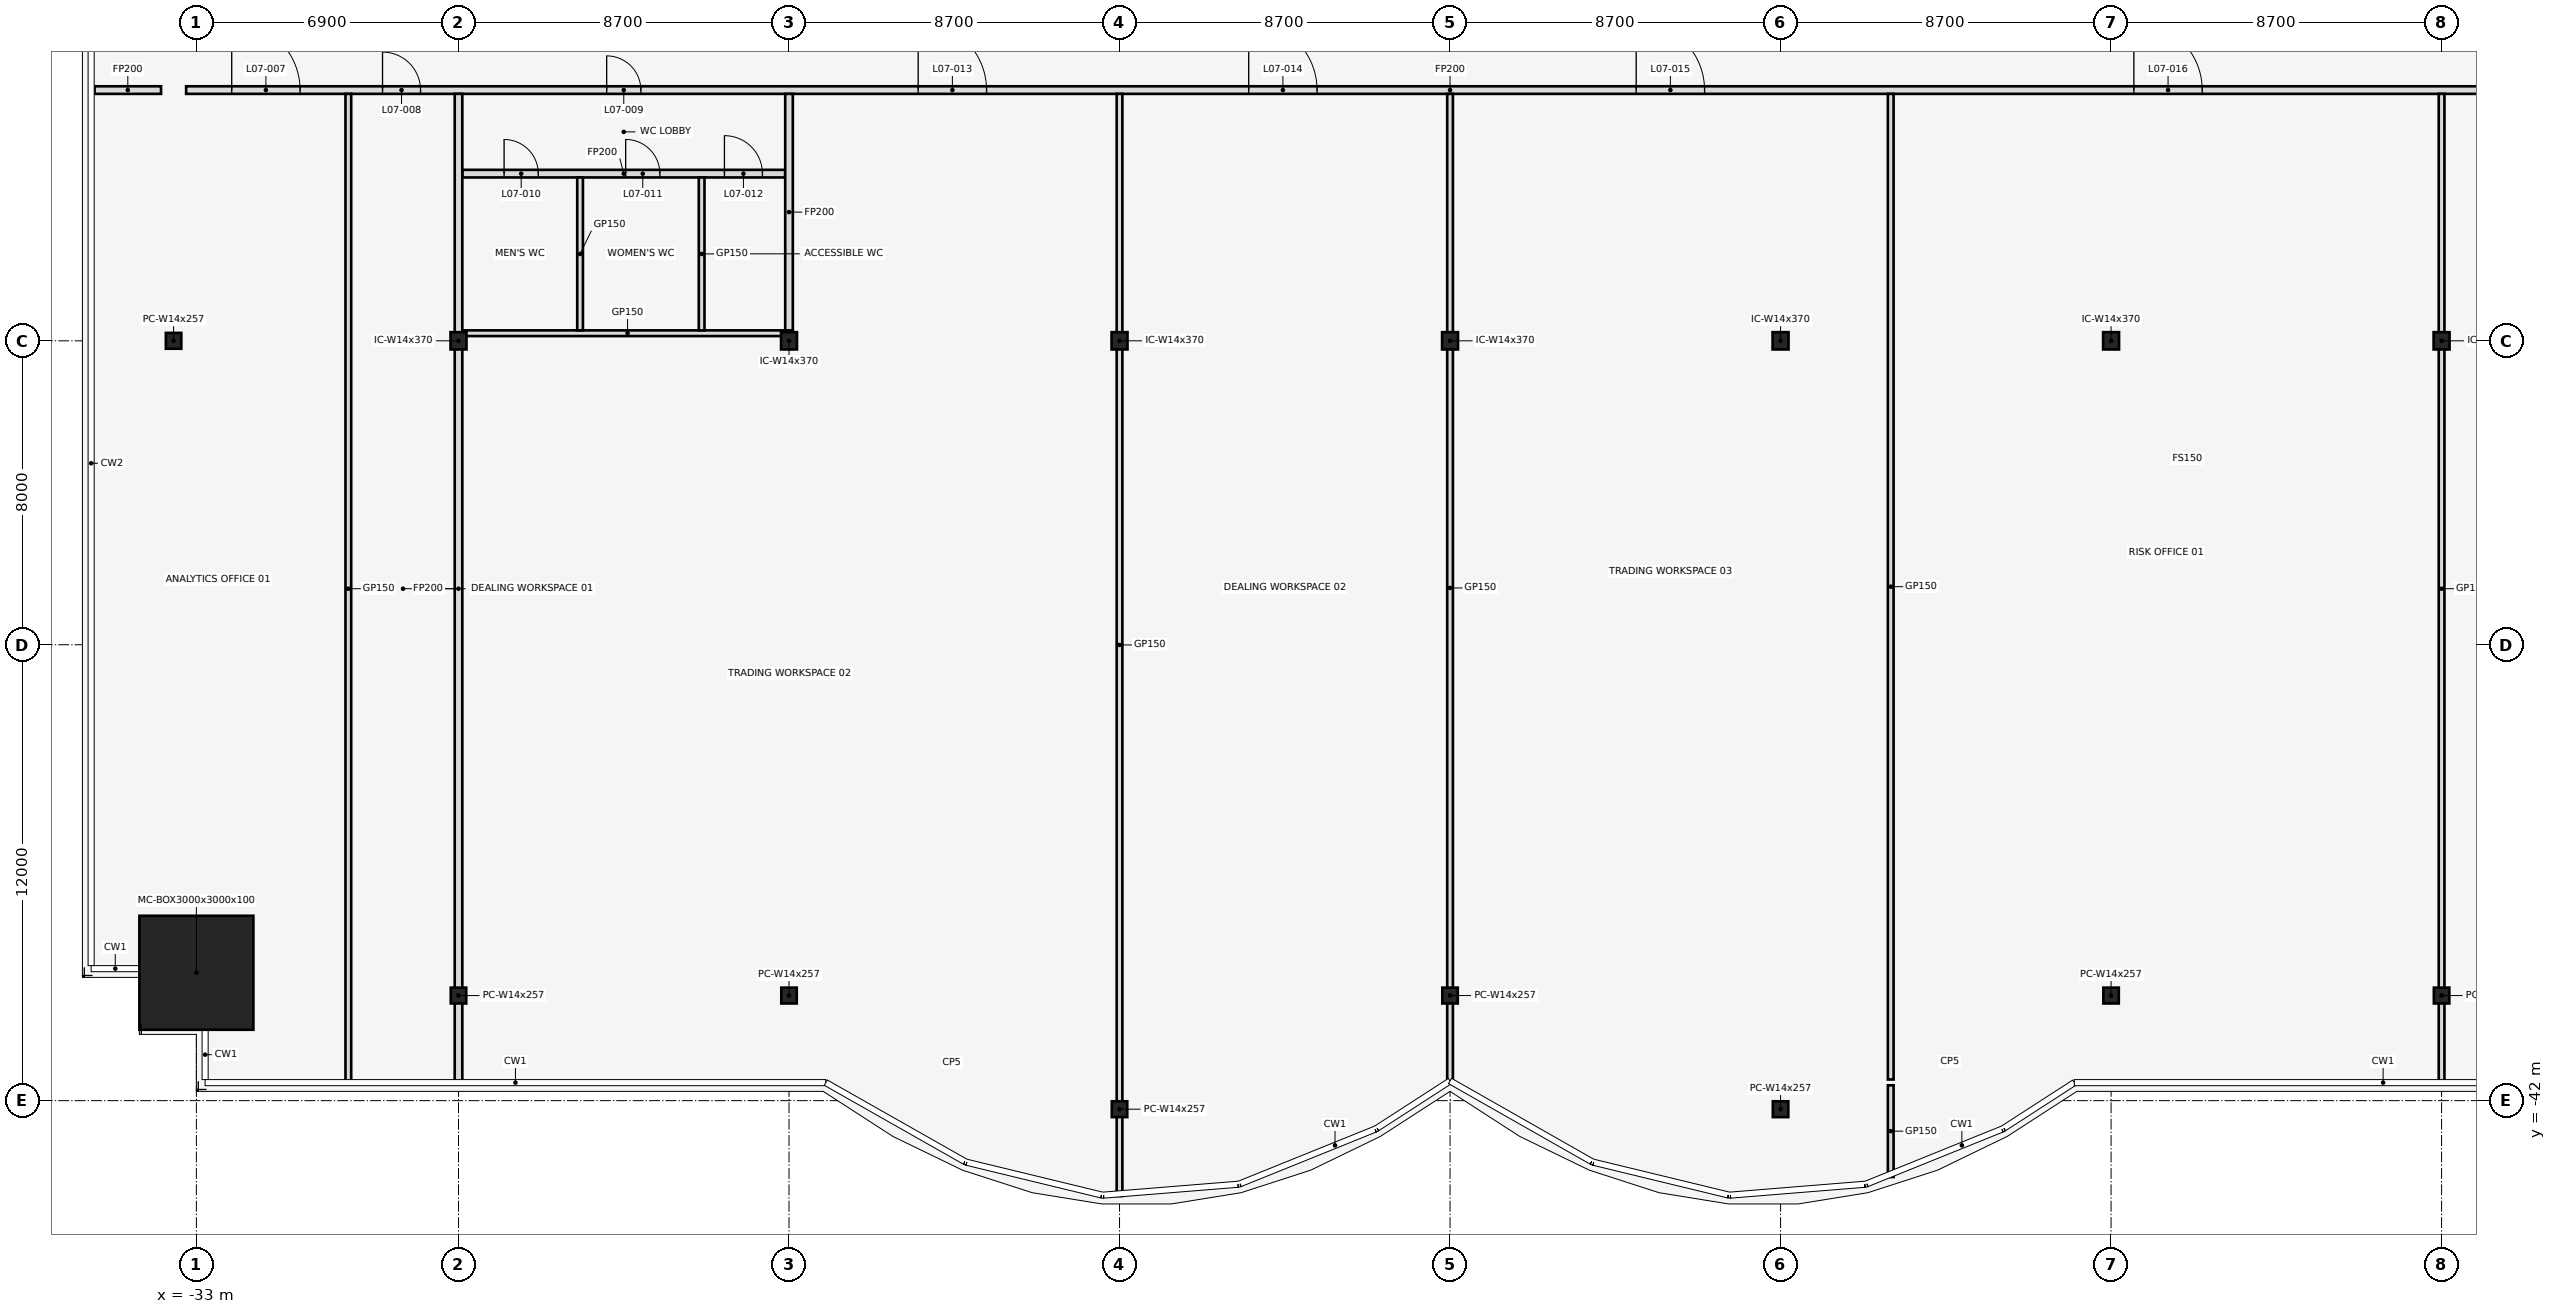
"""IFC4 building model, lengths in metres.
Left out: names, types, materials, properties, quantities, classifications, styles, units other than length and angle.
Written with IfcOpenShell. Run it as: python <this file> out.ifc"""

import sys

from ifc_helpers import new_model, si_unit, direction, frame, frame_2d, origin, origin_2d, place, context, subcontext, project, spatial, rectangle, hollow_rectangle, i_section, extrude, element, fill, save


model = new_model("IFC4")
c1 = context("Model", 3, precision=1e-05, world=origin(), true_north=direction((0.0, 1.0)))
c2 = subcontext(c1, "Body", "Model", "MODEL_VIEW")
j1 = project(units=[si_unit("LENGTHUNIT", "METRE"), si_unit("PLANEANGLEUNIT", "RADIAN")], contexts=[c1])
p1 = place(None, origin())
s1 = spatial("IfcSite", under=j1, at=p1, CompositionType="ELEMENT")
p2 = place(p1, origin())
s2 = spatial("IfcBuilding", under=s1, at=p2, CompositionType="ELEMENT")
p3 = place(p2, frame((0.0, 0.0, 39.5)))
s3 = spatial("IfcBuildingStorey", under=s2, at=p3, CompositionType="ELEMENT", Elevation=39.5)
p4 = place(p3, frame((-33.0, -38.634, 0.0), z_axis=(0.0, 0.0, 1.0), x_axis=(1.0, 0.0, 0.0)))
e1 = element("IfcColumn", 1, at=p4, inside=s3, PredefinedType="COLUMN", context=c2, shape_type="SweptSolid", body=[
    extrude(hollow_rectangle(XDim=3.0, YDim=3.0, WallThickness=0.1, at=origin_2d()), origin(), (0.0, 0.0, 1.0), 4.5),
])
for number, where, z_axis, x_axis in (
    (2, (-26.1, -39.234, 0.0), (0.0, 0.0, 1.0), (1.0, 0.0, 0.0)),
    (3, (-17.4, -39.234, 0.0), (0.0, 0.0, 1.0), (1.0, 0.0, 0.0)),
    (4, (-8.7, -42.225, 0.0), (0.0, 0.0, 1.0), (1.0, 0.0, 0.0)),
    (5, (0.0, -39.234, 0.0), (0.0, 0.0, 1.0), (1.0, 0.0, 0.0)),
    (6, (8.7, -42.225, 0.0), (0.0, 0.0, 1.0), (1.0, 0.0, 0.0)),
    (7, (17.4, -39.234, 0.0), (0.0, 0.0, 1.0), (1.0, 0.0, 0.0)),
    (8, (26.1, -39.234, 0.0), (0.0, 0.0, 1.0), (1.0, 0.0, 0.0)),
    (9, (-33.6, -22.0, 0.0), (0.0, 0.0, 1.0), (1.0, 0.0, 0.0)),
):
    element("IfcColumn", number, at=place(p3, frame(where, z_axis=z_axis, x_axis=x_axis)), inside=s3, PredefinedType="COLUMN", context=c2, shape_type="SweptSolid", body=[
        extrude(i_section(OverallWidth=0.406, OverallDepth=0.417, WebThickness=0.03, FlangeThickness=0.048, at=origin_2d()), origin(), (0.0, 0.0, 1.0), 4.5),
    ])
for number, where, z_axis, x_axis in (
    (10, (-26.1, -22.0, 0.0), (0.0, 0.0, 1.0), (1.0, 0.0, 0.0)),
    (11, (-17.4, -22.0, 0.0), (0.0, 0.0, 1.0), (1.0, 0.0, 0.0)),
    (12, (-8.7, -22.0, 0.0), (0.0, 0.0, 1.0), (1.0, 0.0, 0.0)),
    (13, (0.0, -22.0, 0.0), (0.0, 0.0, 1.0), (1.0, 0.0, 0.0)),
    (14, (8.7, -22.0, 0.0), (0.0, 0.0, 1.0), (1.0, 0.0, 0.0)),
    (15, (17.4, -22.0, 0.0), (0.0, 0.0, 1.0), (1.0, 0.0, 0.0)),
    (16, (26.1, -22.0, 0.0), (0.0, 0.0, 1.0), (1.0, 0.0, 0.0)),
):
    element("IfcColumn", number, at=place(p3, frame(where, z_axis=z_axis, x_axis=x_axis)), inside=s3, PredefinedType="COLUMN", context=c2, shape_type="SweptSolid", body=[
        extrude(i_section(OverallWidth=0.419, OverallDepth=0.455, WebThickness=0.042, FlangeThickness=0.068, at=origin_2d()), origin(), (0.0, 0.0, 1.0), 4.5),
    ])
p5 = place(p3, frame((-26.0, -21.8, 0.0), z_axis=(0.0, 0.0, 1.0), x_axis=(1.0, 0.0, 0.0)))
e17 = element("IfcWall", 17, at=p5, inside=s3, PredefinedType="PARTITIONING", context=c2, shape_type="SweptSolid", body=[
    extrude(rectangle(XDim=8.7, YDim=0.15, at=frame_2d((4.35, 0.0))), origin(), (0.0, 0.0, 1.0), 3.418),
])
p6 = place(p3, frame((-26.0, -17.6, 0.0), z_axis=(0.0, 0.0, 1.0), x_axis=(1.0, 0.0, 0.0)))
e18 = element("IfcWall", 18, at=p6, inside=s3, PredefinedType="PARTITIONING", context=c2, shape_type="SweptSolid", body=[
    extrude(rectangle(XDim=8.5, YDim=0.2, at=frame_2d((4.25, 0.0))), origin(), (0.0, 0.0, 1.0), 3.418),
])
p7 = place(p6, frame((1.1, 0.0, 0.0)))
e19 = element("IfcOpeningElement", 19, at=p7, cuts=e18, PredefinedType="OPENING", context=c2, shape_type="SweptSolid", body=[
    extrude(rectangle(XDim=0.9, YDim=2.1, at=frame_2d((0.45, 1.05))), frame((0.0, 0.112, 0.0), z_axis=(0.0, -1.0, 0.0), x_axis=(1.0, 0.0, 0.0)), (0.0, 0.0, 1.0), 0.224),
])
p8 = place(p6, frame((4.3, 0.0, 0.0)))
e20 = element("IfcOpeningElement", 20, at=p8, cuts=e18, PredefinedType="OPENING", context=c2, shape_type="SweptSolid", body=[
    extrude(rectangle(XDim=0.9, YDim=2.1, at=frame_2d((0.45, 1.05))), frame((0.0, 0.112, 0.0), z_axis=(0.0, -1.0, 0.0), x_axis=(1.0, 0.0, 0.0)), (0.0, 0.0, 1.0), 0.224),
])
p9 = place(p6, frame((6.9, 0.0, 0.0)))
e21 = element("IfcOpeningElement", 21, at=p9, cuts=e18, PredefinedType="OPENING", context=c2, shape_type="SweptSolid", body=[
    extrude(rectangle(XDim=1.0, YDim=2.1, at=frame_2d((0.5, 1.05))), frame((0.0, 0.112, 0.0), z_axis=(0.0, -1.0, 0.0), x_axis=(1.0, 0.0, 0.0)), (0.0, 0.0, 1.0), 0.224),
])
p10 = place(p3, frame((-35.68, -15.4, 0.0), z_axis=(0.0, 0.0, 1.0), x_axis=(1.0, 0.0, 0.0)))
e22 = element("IfcWall", 22, at=p10, inside=s3, PredefinedType="PARTITIONING", context=c2, shape_type="SweptSolid", body=[
    extrude(rectangle(XDim=1.75, YDim=0.2, at=frame_2d((0.875, 0.0))), origin(), (0.0, 0.0, 1.0), 3.418),
])
p11 = place(p3, frame((-33.27, -15.4, 0.0), z_axis=(0.0, 0.0, 1.0), x_axis=(1.0, 0.0, 0.0)))
e23 = element("IfcWall", 23, at=p11, inside=s3, PredefinedType="PARTITIONING", context=c2, shape_type="SweptSolid", body=[
    extrude(rectangle(XDim=66.54, YDim=0.2, at=frame_2d((33.27, 0.0))), origin(), (0.0, 0.0, 1.0), 3.418),
])
p12 = place(p11, frame((1.2, 0.0, 0.0)))
e24 = element("IfcOpeningElement", 24, at=p12, cuts=e23, PredefinedType="OPENING", context=c2, shape_type="SweptSolid", body=[
    extrude(rectangle(XDim=1.8, YDim=2.1, at=frame_2d((0.9, 1.05))), frame((0.0, 0.112, 0.0), z_axis=(0.0, -1.0, 0.0), x_axis=(1.0, 0.0, 0.0)), (0.0, 0.0, 1.0), 0.224),
])
p13 = place(p11, frame((5.17, 0.0, 0.0)))
e25 = element("IfcOpeningElement", 25, at=p13, cuts=e23, PredefinedType="OPENING", context=c2, shape_type="SweptSolid", body=[
    extrude(rectangle(XDim=1.0, YDim=2.1, at=frame_2d((0.5, 1.05))), frame((0.0, 0.112, 0.0), z_axis=(0.0, -1.0, 0.0), x_axis=(1.0, 0.0, 0.0)), (0.0, 0.0, 1.0), 0.224),
])
p14 = place(p11, frame((11.07, 0.0, 0.0)))
e26 = element("IfcOpeningElement", 26, at=p14, cuts=e23, PredefinedType="OPENING", context=c2, shape_type="SweptSolid", body=[
    extrude(rectangle(XDim=0.9, YDim=2.1, at=frame_2d((0.45, 1.05))), frame((0.0, 0.112, 0.0), z_axis=(0.0, -1.0, 0.0), x_axis=(1.0, 0.0, 0.0)), (0.0, 0.0, 1.0), 0.224),
])
p15 = place(p11, frame((19.27, 0.0, 0.0)))
e27 = element("IfcOpeningElement", 27, at=p15, cuts=e23, PredefinedType="OPENING", context=c2, shape_type="SweptSolid", body=[
    extrude(rectangle(XDim=1.8, YDim=2.1, at=frame_2d((0.9, 1.05))), frame((0.0, 0.112, 0.0), z_axis=(0.0, -1.0, 0.0), x_axis=(1.0, 0.0, 0.0)), (0.0, 0.0, 1.0), 0.224),
])
p16 = place(p11, frame((27.97, 0.0, 0.0)))
e28 = element("IfcOpeningElement", 28, at=p16, cuts=e23, PredefinedType="OPENING", context=c2, shape_type="SweptSolid", body=[
    extrude(rectangle(XDim=1.8, YDim=2.1, at=frame_2d((0.9, 1.05))), frame((0.0, 0.112, 0.0), z_axis=(0.0, -1.0, 0.0), x_axis=(1.0, 0.0, 0.0)), (0.0, 0.0, 1.0), 0.224),
])
p17 = place(p11, frame((38.17, 0.0, 0.0)))
e29 = element("IfcOpeningElement", 29, at=p17, cuts=e23, PredefinedType="OPENING", context=c2, shape_type="SweptSolid", body=[
    extrude(rectangle(XDim=1.8, YDim=2.1, at=frame_2d((0.9, 1.05))), frame((0.0, 0.112, 0.0), z_axis=(0.0, -1.0, 0.0), x_axis=(1.0, 0.0, 0.0)), (0.0, 0.0, 1.0), 0.224),
])
p18 = place(p11, frame((51.27, 0.0, 0.0)))
e30 = element("IfcOpeningElement", 30, at=p18, cuts=e23, PredefinedType="OPENING", context=c2, shape_type="SweptSolid", body=[
    extrude(rectangle(XDim=1.8, YDim=2.1, at=frame_2d((0.9, 1.05))), frame((0.0, 0.112, 0.0), z_axis=(0.0, -1.0, 0.0), x_axis=(1.0, 0.0, 0.0)), (0.0, 0.0, 1.0), 0.224),
])
p19 = place(p11, frame((62.07, 0.0, 0.0)))
e31 = element("IfcOpeningElement", 31, at=p19, cuts=e23, PredefinedType="OPENING", context=c2, shape_type="SweptSolid", body=[
    extrude(rectangle(XDim=1.8, YDim=2.1, at=frame_2d((0.9, 1.05))), frame((0.0, 0.112, 0.0), z_axis=(0.0, -1.0, 0.0), x_axis=(1.0, 0.0, 0.0)), (0.0, 0.0, 1.0), 0.224),
])
p20 = place(p3, frame((-29.0, -41.55, 0.0), z_axis=(0.0, 0.0, 1.0), x_axis=(0.0, 1.0, 0.0)))
e32 = element("IfcWall", 32, at=p20, inside=s3, PredefinedType="PARTITIONING", context=c2, shape_type="SweptSolid", body=[
    extrude(rectangle(XDim=26.05, YDim=0.15, at=frame_2d((13.025, 0.0))), origin(), (0.0, 0.0, 1.0), 3.418),
])
p21 = place(p3, frame((-26.1, -41.55, 0.0), z_axis=(0.0, 0.0, 1.0), x_axis=(0.0, 1.0, 0.0)))
e33 = element("IfcWall", 33, at=p21, inside=s3, PredefinedType="PARTITIONING", context=c2, shape_type="SweptSolid", body=[
    extrude(rectangle(XDim=26.05, YDim=0.2, at=frame_2d((13.025, 0.0))), origin(), (0.0, 0.0, 1.0), 3.418),
])
for number, where, z_axis, x_axis in (
    (34, (-22.9, -21.725, 0.0), (0.0, 0.0, 1.0), (0.0, 1.0, 0.0)),
    (35, (-19.7, -21.725, 0.0), (0.0, 0.0, 1.0), (0.0, 1.0, 0.0)),
):
    element("IfcWall", number, at=place(p3, frame(where, z_axis=z_axis, x_axis=x_axis)), inside=s3, PredefinedType="PARTITIONING", context=c2, shape_type="SweptSolid", body=[
        extrude(rectangle(XDim=4.025, YDim=0.15, at=frame_2d((2.013, 0.0))), origin(), (0.0, 0.0, 1.0), 3.418),
    ])
p22 = place(p3, frame((-17.4, -21.725, 0.0), z_axis=(0.0, 0.0, 1.0), x_axis=(0.0, 1.0, 0.0)))
e36 = element("IfcWall", 36, at=p22, inside=s3, PredefinedType="PARTITIONING", context=c2, shape_type="SweptSolid", body=[
    extrude(rectangle(XDim=6.225, YDim=0.2, at=frame_2d((3.113, 0.0))), origin(), (0.0, 0.0, 1.0), 3.418),
])
p23 = place(p3, frame((-8.7, -44.51, 0.0), z_axis=(0.0, 0.0, 1.0), x_axis=(0.0, 1.0, 0.0)))
e37 = element("IfcWall", 37, at=p23, inside=s3, PredefinedType="PARTITIONING", context=c2, shape_type="SweptSolid", body=[
    extrude(rectangle(XDim=29.01, YDim=0.15, at=frame_2d((14.505, 0.0))), origin(), (0.0, 0.0, 1.0), 3.418),
])
p24 = place(p3, frame((0.0, -41.51, 0.0), z_axis=(0.0, 0.0, 1.0), x_axis=(0.0, 1.0, 0.0)))
e38 = element("IfcWall", 38, at=p24, inside=s3, PredefinedType="PARTITIONING", context=c2, shape_type="SweptSolid", body=[
    extrude(rectangle(XDim=26.01, YDim=0.15, at=frame_2d((13.005, 0.0))), origin(), (0.0, 0.0, 1.0), 3.418),
])
p25 = place(p3, frame((11.6, -44.01, 0.0), z_axis=(0.0, 0.0, 1.0), x_axis=(0.0, 1.0, 0.0)))
e39 = element("IfcWall", 39, at=p25, inside=s3, PredefinedType="PARTITIONING", context=c2, shape_type="SweptSolid", body=[
    extrude(rectangle(XDim=2.414, YDim=0.15, at=frame_2d((1.207, 0.0))), origin(), (0.0, 0.0, 1.0), 3.418),
])
p26 = place(p3, frame((11.6, -41.443, 0.0), z_axis=(0.0, 0.0, 1.0), x_axis=(0.0, 1.0, 0.0)))
e40 = element("IfcWall", 40, at=p26, inside=s3, PredefinedType="PARTITIONING", context=c2, shape_type="SweptSolid", body=[
    extrude(rectangle(XDim=25.943, YDim=0.15, at=frame_2d((12.972, 0.0))), origin(), (0.0, 0.0, 1.0), 3.418),
])
p27 = place(p3, frame((26.1, -41.55, 0.0), z_axis=(0.0, 0.0, 1.0), x_axis=(0.0, 1.0, 0.0)))
e41 = element("IfcWall", 41, at=p27, inside=s3, PredefinedType="PARTITIONING", context=c2, shape_type="SweptSolid", body=[
    extrude(rectangle(XDim=26.05, YDim=0.15, at=frame_2d((13.025, 0.0))), origin(), (0.0, 0.0, 1.0), 3.418),
])
p28 = place(p12, origin())
e42 = element("IfcDoor", 42, at=p28, inside=s3, OperationType="SINGLE_SWING_LEFT", PredefinedType="DOOR", context=c2, shape_type="SweptSolid", body=[
    extrude(rectangle(XDim=1.8, YDim=2.1, at=frame_2d((0.9, 1.05))), frame((0.0, 0.025, 0.0), z_axis=(0.0, -1.0, 0.0), x_axis=(1.0, 0.0, 0.0)), (0.0, 0.0, 1.0), 0.05),
])
fill(e24, e42)
p29 = place(p13, frame((1.0, 0.0, 0.0), z_axis=(0.0, 0.0, 1.0), x_axis=(-1.0, 0.0, 0.0)))
e43 = element("IfcDoor", 43, at=p29, inside=s3, OperationType="SINGLE_SWING_RIGHT", PredefinedType="DOOR", context=c2, shape_type="SweptSolid", body=[
    extrude(rectangle(XDim=1.0, YDim=2.1, at=frame_2d((0.5, 1.05))), frame((0.0, 0.025, 0.0), z_axis=(0.0, -1.0, 0.0), x_axis=(1.0, 0.0, 0.0)), (0.0, 0.0, 1.0), 0.05),
])
fill(e25, e43)
p30 = place(p14, frame((0.9, 0.0, 0.0), z_axis=(0.0, 0.0, 1.0), x_axis=(-1.0, 0.0, 0.0)))
e44 = element("IfcDoor", 44, at=p30, inside=s3, OperationType="SINGLE_SWING_RIGHT", PredefinedType="DOOR", context=c2, shape_type="SweptSolid", body=[
    extrude(rectangle(XDim=0.9, YDim=2.1, at=frame_2d((0.45, 1.05))), frame((0.0, 0.025, 0.0), z_axis=(0.0, -1.0, 0.0), x_axis=(1.0, 0.0, 0.0)), (0.0, 0.0, 1.0), 0.05),
])
fill(e26, e44)
p31 = place(p7, frame((0.9, 0.0, 0.0), z_axis=(0.0, 0.0, 1.0), x_axis=(-1.0, 0.0, 0.0)))
e45 = element("IfcDoor", 45, at=p31, inside=s3, OperationType="SINGLE_SWING_LEFT", PredefinedType="DOOR", context=c2, shape_type="SweptSolid", body=[
    extrude(rectangle(XDim=0.9, YDim=2.1, at=frame_2d((0.45, 1.05))), frame((0.0, 0.025, 0.0), z_axis=(0.0, -1.0, 0.0), x_axis=(1.0, 0.0, 0.0)), (0.0, 0.0, 1.0), 0.05),
])
fill(e19, e45)
p32 = place(p8, frame((0.9, 0.0, 0.0), z_axis=(0.0, 0.0, 1.0), x_axis=(-1.0, 0.0, 0.0)))
e46 = element("IfcDoor", 46, at=p32, inside=s3, OperationType="SINGLE_SWING_RIGHT", PredefinedType="DOOR", context=c2, shape_type="SweptSolid", body=[
    extrude(rectangle(XDim=0.9, YDim=2.1, at=frame_2d((0.45, 1.05))), frame((0.0, 0.025, 0.0), z_axis=(0.0, -1.0, 0.0), x_axis=(1.0, 0.0, 0.0)), (0.0, 0.0, 1.0), 0.05),
])
fill(e20, e46)
p33 = place(p9, frame((1.0, 0.0, 0.0), z_axis=(0.0, 0.0, 1.0), x_axis=(-1.0, 0.0, 0.0)))
e47 = element("IfcDoor", 47, at=p33, inside=s3, OperationType="SINGLE_SWING_RIGHT", PredefinedType="DOOR", context=c2, shape_type="SweptSolid", body=[
    extrude(rectangle(XDim=1.0, YDim=2.1, at=frame_2d((0.5, 1.05))), frame((0.0, 0.025, 0.0), z_axis=(0.0, -1.0, 0.0), x_axis=(1.0, 0.0, 0.0)), (0.0, 0.0, 1.0), 0.05),
])
fill(e21, e47)
p34 = place(p15, origin())
e48 = element("IfcDoor", 48, at=p34, inside=s3, OperationType="SINGLE_SWING_LEFT", PredefinedType="DOOR", context=c2, shape_type="SweptSolid", body=[
    extrude(rectangle(XDim=1.8, YDim=2.1, at=frame_2d((0.9, 1.05))), frame((0.0, 0.025, 0.0), z_axis=(0.0, -1.0, 0.0), x_axis=(1.0, 0.0, 0.0)), (0.0, 0.0, 1.0), 0.05),
])
fill(e27, e48)
p35 = place(p16, origin())
e49 = element("IfcDoor", 49, at=p35, inside=s3, OperationType="SINGLE_SWING_LEFT", PredefinedType="DOOR", context=c2, shape_type="SweptSolid", body=[
    extrude(rectangle(XDim=1.8, YDim=2.1, at=frame_2d((0.9, 1.05))), frame((0.0, 0.025, 0.0), z_axis=(0.0, -1.0, 0.0), x_axis=(1.0, 0.0, 0.0)), (0.0, 0.0, 1.0), 0.05),
])
fill(e28, e49)
p36 = place(p17, origin())
e50 = element("IfcDoor", 50, at=p36, inside=s3, OperationType="SINGLE_SWING_LEFT", PredefinedType="DOOR", context=c2, shape_type="SweptSolid", body=[
    extrude(rectangle(XDim=1.8, YDim=2.1, at=frame_2d((0.9, 1.05))), frame((0.0, 0.025, 0.0), z_axis=(0.0, -1.0, 0.0), x_axis=(1.0, 0.0, 0.0)), (0.0, 0.0, 1.0), 0.05),
])
fill(e29, e50)
p37 = place(p18, origin())
e51 = element("IfcDoor", 51, at=p37, inside=s3, OperationType="SINGLE_SWING_LEFT", PredefinedType="DOOR", context=c2, shape_type="SweptSolid", body=[
    extrude(rectangle(XDim=1.8, YDim=2.1, at=frame_2d((0.9, 1.05))), frame((0.0, 0.025, 0.0), z_axis=(0.0, -1.0, 0.0), x_axis=(1.0, 0.0, 0.0)), (0.0, 0.0, 1.0), 0.05),
])
fill(e30, e51)
save(model, sys.argv[1])
